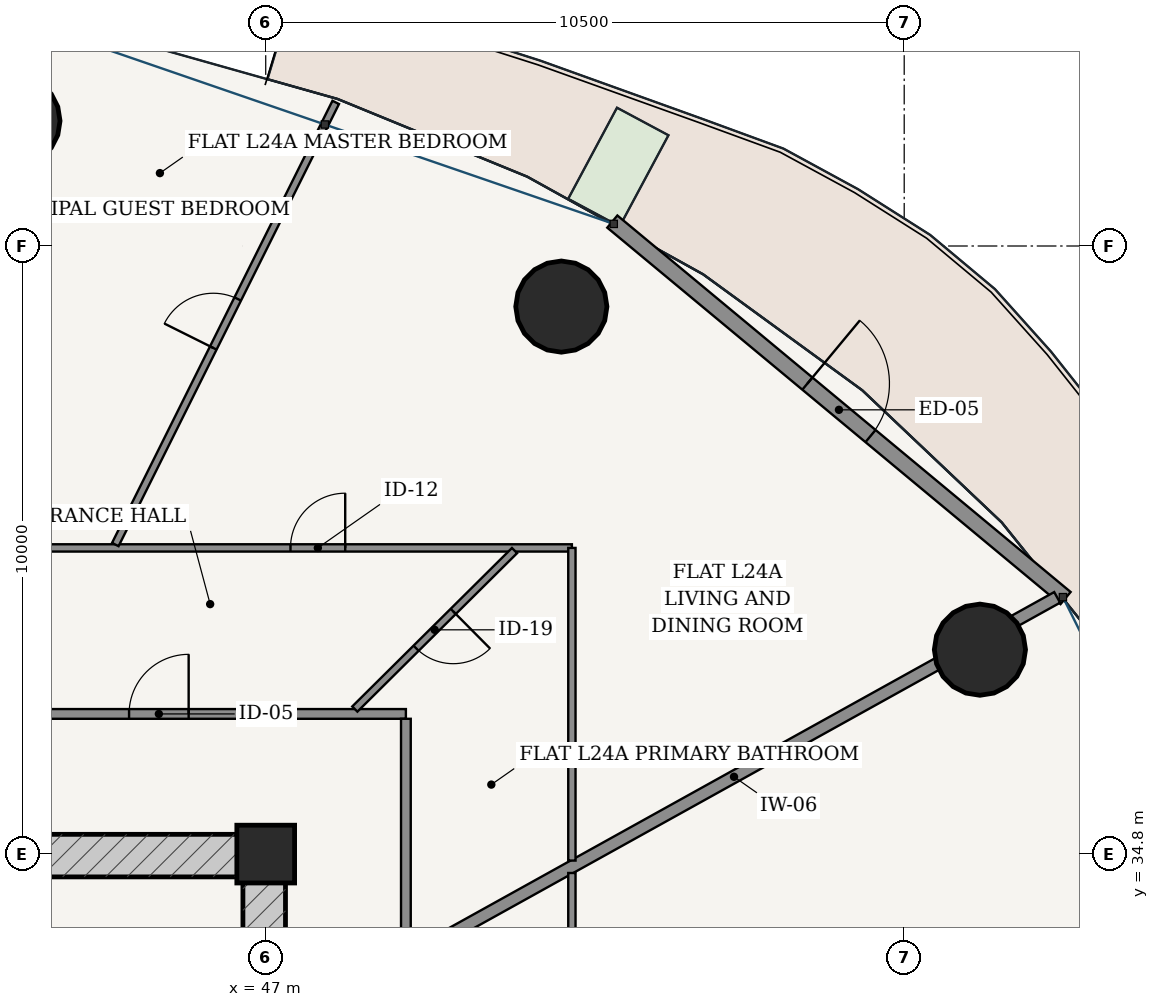
"""IFC4 building model, lengths in metres.
Left out: names, types, materials, properties, quantities, classifications, styles, units other than length and angle.
Written with IfcOpenShell. Run it as: python <this file> out.ifc"""

import sys

from ifc_helpers import new_model, si_unit, direction, frame, frame_2d, origin, origin_2d, place, context, subcontext, project, spatial, rectangle, hollow_circle, extrude, source, transform, mapped, element, fill, save


model = new_model("IFC4")
c1 = context("Model", 3, precision=1e-05, world=origin(), true_north=direction((-0.2419218956, 0.970295726276)))
c2 = subcontext(c1, "Body", "Model", "MODEL_VIEW")
j1 = project(units=[si_unit("LENGTHUNIT", "METRE"), si_unit("PLANEANGLEUNIT", "RADIAN")], contexts=[c1])
p1 = place(None, origin())
s1 = spatial("IfcSite", under=j1, at=p1, CompositionType="ELEMENT")
p2 = place(p1, origin())
s2 = spatial("IfcBuilding", under=s1, at=p2, CompositionType="ELEMENT")
p3 = place(p2, frame((0.0, 0.0, 94.2)))
s3 = spatial("IfcBuildingStorey", under=s2, at=p3, CompositionType="ELEMENT", Elevation=94.2)
p4 = place(p3, frame((47.0, 34.8, 0.0), z_axis=(0.0, 0.0, 1.0), x_axis=(1.0, 0.0, 0.0)))
e1 = element("IfcColumn", 1, at=p4, inside=s3, PredefinedType="COLUMN", context=c2, shape_type="SweptSolid", body=[
    extrude(rectangle(XDim=0.95, YDim=0.95, at=origin_2d()), origin(), (0.0, 0.0, 1.0), 3.6),
])
p5 = place(p3, frame((28.675, 34.775, 0.0), z_axis=(0.0, 0.0, 1.0), x_axis=(1.0, 0.0, 0.0)))
e2 = element("IfcWall", 2, at=p5, inside=s3, PredefinedType="SHEAR", context=c2, shape_type="SweptSolid", body=[
    extrude(rectangle(XDim=18.65, YDim=0.7, at=frame_2d((9.325, 0.0))), origin(), (0.0, 0.0, 1.0), 3.325),
])
p6 = place(p5, frame((8.9, 0.0, 0.0)))
e3 = element("IfcOpeningElement", 3, at=p6, cuts=e2, PredefinedType="OPENING", context=c2, shape_type="SweptSolid", body=[
    extrude(rectangle(XDim=0.85, YDim=2.1, at=frame_2d((0.425, 1.05))), frame((0.0, 0.36, 0.0), z_axis=(0.0, -1.0, 0.0), x_axis=(1.0, 0.0, 0.0)), (0.0, 0.0, 1.0), 0.72),
])
p7 = place(p3, frame((46.975, 19.175, 0.0), z_axis=(0.0, 0.0, 1.0), x_axis=(0.0, 1.0, 0.0)))
e4 = element("IfcWall", 4, at=p7, inside=s3, PredefinedType="SHEAR", context=c2, shape_type="SweptSolid", body=[
    extrude(rectangle(XDim=15.25, YDim=0.7, at=frame_2d((7.625, 0.0))), origin(), (0.0, 0.0, 1.0), 3.325),
])
p8 = place(p7, frame((9.875, 0.0, 0.0)))
e5 = element("IfcOpeningElement", 5, at=p8, cuts=e4, PredefinedType="OPENING", context=c2, shape_type="SweptSolid", body=[
    extrude(rectangle(XDim=1.5, YDim=2.2, at=frame_2d((0.75, 1.1))), frame((0.0, 0.36, 0.0), z_axis=(0.0, -1.0, 0.0), x_axis=(1.0, 0.0, 0.0)), (0.0, 0.0, 1.0), 0.72),
])
for number, where, z_axis, x_axis in (
    (6, (58.745, 38.161, 0.0), (0.0, 0.0, 1.0), (1.0, 0.0, 0.0)),
    (7, (51.862, 43.803, 0.0), (0.0, 0.0, 1.0), (1.0, 0.0, 0.0)),
    (8, (42.867, 46.857, 0.0), (0.0, 0.0, 1.0), (1.0, 0.0, 0.0)),
):
    element("IfcColumn", number, at=place(p3, frame(where, z_axis=z_axis, x_axis=x_axis)), inside=s3, PredefinedType="COLUMN", context=c2, shape_type="SweptSolid", body=[
        extrude(hollow_circle(Radius=0.75, WallThickness=0.045, at=origin_2d()), origin(), (0.0, 0.0, 1.0), 3.6),
    ])
p9 = place(p3, frame((60.154, 39.01, 0.0), z_axis=(0.0, 0.0, 1.0), x_axis=(-0.769242574941, 0.638956853706, 0.0)))
e9 = element("IfcWall", 9, at=p9, inside=s3, PredefinedType="SOLIDWALL", context=c2, shape_type="SweptSolid", body=[
    extrude(rectangle(XDim=9.69, YDim=0.26, at=frame_2d((4.845, 0.0))), origin(), (0.0, 0.0, 1.0), 3.325),
])
p10 = place(p9, frame((4.17, 0.0, 0.0)))
e10 = element("IfcOpeningElement", 10, at=p10, cuts=e9, PredefinedType="OPENING", context=c2, shape_type="SweptSolid", body=[
    extrude(rectangle(XDim=1.35, YDim=2.2, at=frame_2d((0.675, 1.1))), frame((0.0, 0.14, 0.0), z_axis=(0.0, -1.0, 0.0), x_axis=(1.0, 0.0, 0.0)), (0.0, 0.0, 1.0), 0.28),
])
p11 = place(p3, frame((26.695, 37.105, 0.0), z_axis=(0.0, 0.0, 1.0), x_axis=(1.0, 0.0, 0.0)))
e11 = element("IfcWall", 11, at=p11, inside=s3, PredefinedType="PARTITIONING", context=c2, shape_type="SweptSolid", body=[
    extrude(rectangle(XDim=22.61, YDim=0.16, at=frame_2d((11.305, 0.0))), origin(), (0.0, 0.0, 1.0), 2.767),
])
p12 = place(p11, frame((18.058, 0.0, 0.0)))
e12 = element("IfcOpeningElement", 12, at=p12, cuts=e11, PredefinedType="OPENING", context=c2, shape_type="SweptSolid", body=[
    extrude(rectangle(XDim=0.98, YDim=2.2, at=frame_2d((0.49, 1.1))), frame((0.0, 0.09, 0.0), z_axis=(0.0, -1.0, 0.0), x_axis=(1.0, 0.0, 0.0)), (0.0, 0.0, 1.0), 0.18),
])
p13 = place(p3, frame((49.305, 16.575, 0.0), z_axis=(0.0, 0.0, 1.0), x_axis=(0.0, 1.0, 0.0)))
e13 = element("IfcWall", 13, at=p13, inside=s3, PredefinedType="PARTITIONING", context=c2, shape_type="SweptSolid", body=[
    extrude(rectangle(XDim=20.45, YDim=0.16, at=frame_2d((10.225, 0.0))), origin(), (0.0, 0.0, 1.0), 2.767),
])
p14 = place(p3, frame((49.387, 33.121, 0.0), z_axis=(0.0, 0.0, 1.0), x_axis=(0.874320165728, 0.485349613992, 0.0)))
e14 = element("IfcWall", 14, at=p14, inside=s3, PredefinedType="PARTITIONING", context=c2, shape_type="SweptSolid", body=[
    extrude(rectangle(XDim=12.156, YDim=0.2, at=frame_2d((6.078, 0.0))), origin(), (0.0, 0.0, 1.0), 2.767),
])
p15 = place(p3, frame((23.965, 39.835, 0.0), z_axis=(0.0, 0.0, 1.0), x_axis=(1.0, 0.0, 0.0)))
e15 = element("IfcWall", 15, at=p15, inside=s3, PredefinedType="PARTITIONING", context=c2, shape_type="SweptSolid", body=[
    extrude(rectangle(XDim=28.07, YDim=0.12, at=frame_2d((14.035, 0.0))), origin(), (0.0, 0.0, 1.0), 2.767),
])
p16 = place(p15, frame((23.442, 0.0, 0.0)))
e16 = element("IfcOpeningElement", 16, at=p16, cuts=e15, PredefinedType="OPENING", context=c2, shape_type="SweptSolid", body=[
    extrude(rectangle(XDim=0.9, YDim=2.15, at=frame_2d((0.45, 1.075))), frame((0.0, 0.07, 0.0), z_axis=(0.0, -1.0, 0.0), x_axis=(1.0, 0.0, 0.0)), (0.0, 0.0, 1.0), 0.14),
])
p17 = place(p3, frame((52.035, 39.835, 0.0), z_axis=(0.0, 0.0, 1.0), x_axis=(0.0, -1.0, 0.0)))
e17 = element("IfcWall", 17, at=p17, inside=s3, PredefinedType="PARTITIONING", context=c2, shape_type="SweptSolid", body=[
    extrude(rectangle(XDim=5.142, YDim=0.12, at=frame_2d((2.571, 0.0))), origin(), (0.0, 0.0, 1.0), 3.004),
])
p18 = place(p3, frame((44.526, 39.89, 0.0), z_axis=(0.0, 0.0, 1.0), x_axis=(0.446167584581, 0.894949432353, 0.0)))
e18 = element("IfcWall", 18, at=p18, inside=s3, PredefinedType="PARTITIONING", context=c2, shape_type="SweptSolid", body=[
    extrude(rectangle(XDim=8.125, YDim=0.12, at=frame_2d((4.062, 0.0))), origin(), (0.0, 0.0, 1.0), 2.767),
])
p19 = place(p18, frame((3.612, 0.0, 0.0)))
e19 = element("IfcOpeningElement", 19, at=p19, cuts=e18, PredefinedType="OPENING", context=c2, shape_type="SweptSolid", body=[
    extrude(rectangle(XDim=0.9, YDim=2.15, at=frame_2d((0.45, 1.075))), frame((0.0, 0.07, 0.0), z_axis=(0.0, -1.0, 0.0), x_axis=(1.0, 0.0, 0.0)), (0.0, 0.0, 1.0), 0.14),
])
p20 = place(p3, frame((48.465, 37.185, 0.0), z_axis=(0.0, 0.0, 1.0), x_axis=(0.709839752998, 0.704363205359, 0.0)))
e20 = element("IfcWall", 20, at=p20, inside=s3, PredefinedType="PARTITIONING", context=c2, shape_type="SweptSolid", body=[
    extrude(rectangle(XDim=3.7, YDim=0.12, at=frame_2d((1.85, 0.0))), origin(), (0.0, 0.0, 1.0), 2.767),
])
p21 = place(p20, frame((1.42, 0.0, 0.0)))
e21 = element("IfcOpeningElement", 21, at=p21, cuts=e20, PredefinedType="OPENING", context=c2, shape_type="SweptSolid", body=[
    extrude(rectangle(XDim=0.86, YDim=2.15, at=frame_2d((0.43, 1.075))), frame((0.0, 0.07, 0.0), z_axis=(0.0, -1.0, 0.0), x_axis=(1.0, 0.0, 0.0)), (0.0, 0.0, 1.0), 0.14),
])
p22 = place(p3, frame((52.035, 34.49, 0.0), z_axis=(0.0, 0.0, 1.0), x_axis=(0.0, -1.0, 0.0)))
e22 = element("IfcWall", 22, at=p22, inside=s3, PredefinedType="PARTITIONING", context=c2, shape_type="SweptSolid", body=[
    extrude(rectangle(XDim=20.725, YDim=0.12, at=frame_2d((10.362, 0.0))), origin(), (0.0, 0.0, 1.0), 2.767),
])
p23 = place(p22, frame((17.493, 0.0, 0.0)))
e23 = element("IfcOpeningElement", 23, at=p23, cuts=e22, PredefinedType="OPENING", context=c2, shape_type="SweptSolid", body=[
    extrude(rectangle(XDim=0.9, YDim=2.15, at=frame_2d((0.45, 1.075))), frame((0.0, 0.07, 0.0), z_axis=(0.0, -1.0, 0.0), x_axis=(1.0, 0.0, 0.0)), (0.0, 0.0, 1.0), 0.14),
])
p24 = place(p22, frame((14.064, 0.0, 0.0)))
e24 = element("IfcOpeningElement", 24, at=p24, cuts=e22, PredefinedType="OPENING", context=c2, shape_type="SweptSolid", body=[
    extrude(rectangle(XDim=0.9, YDim=2.15, at=frame_2d((0.45, 1.075))), frame((0.0, 0.07, 0.0), z_axis=(0.0, -1.0, 0.0), x_axis=(1.0, 0.0, 0.0)), (0.0, 0.0, 1.0), 0.14),
])
m1 = source(origin(), c2, "Body", "SweptSolid", [
    extrude(rectangle(XDim=1.35, YDim=2.2, at=frame_2d((0.675, 1.1))), frame((0.0, 0.025, 0.0), z_axis=(0.0, -1.0, 0.0), x_axis=(1.0, 0.0, 0.0)), (0.0, 0.0, 1.0), 0.05),
])
p25 = place(p10, frame((1.35, 0.0, 0.0), z_axis=(0.0, 0.0, 1.0), x_axis=(-1.0, 0.0, 0.0)))
e25 = element("IfcDoor", 25, at=p25, inside=s3, OperationType="SINGLE_SWING_LEFT", PredefinedType="DOOR", context=c2, shape_type="MappedRepresentation", body=[
    mapped(m1, transform((0.0, 0.0, 0.0), scale=1.0)),
])
fill(e10, e25)
m2 = source(origin(), c2, "Body", "SweptSolid", [
    extrude(rectangle(XDim=0.98, YDim=2.2, at=frame_2d((0.49, 1.1))), frame((0.0, 0.025, 0.0), z_axis=(0.0, -1.0, 0.0), x_axis=(1.0, 0.0, 0.0)), (0.0, 0.0, 1.0), 0.05),
])
p26 = place(p12, origin())
e26 = element("IfcDoor", 26, at=p26, inside=s3, OperationType="SINGLE_SWING_RIGHT", PredefinedType="DOOR", context=c2, shape_type="MappedRepresentation", body=[
    mapped(m2, transform((0.0, 0.0, 0.0), scale=1.0)),
])
fill(e12, e26)
m3 = source(origin(), c2, "Body", "SweptSolid", [
    extrude(rectangle(XDim=0.86, YDim=2.15, at=frame_2d((0.43, 1.075))), frame((0.0, 0.025, 0.0), z_axis=(0.0, -1.0, 0.0), x_axis=(1.0, 0.0, 0.0)), (0.0, 0.0, 1.0), 0.05),
])
p27 = place(p21, frame((0.86, 0.0, 0.0), z_axis=(0.0, 0.0, 1.0), x_axis=(-1.0, 0.0, 0.0)))
e27 = element("IfcDoor", 27, at=p27, inside=s3, OperationType="SINGLE_SWING_LEFT", PredefinedType="DOOR", context=c2, shape_type="MappedRepresentation", body=[
    mapped(m3, transform((0.0, 0.0, 0.0), scale=1.0)),
])
fill(e21, e27)
m4 = source(origin(), c2, "Body", "SweptSolid", [
    extrude(rectangle(XDim=0.9, YDim=2.15, at=frame_2d((0.45, 1.075))), frame((0.0, 0.025, 0.0), z_axis=(0.0, -1.0, 0.0), x_axis=(1.0, 0.0, 0.0)), (0.0, 0.0, 1.0), 0.05),
])
p28 = place(p16, origin())
e28 = element("IfcDoor", 28, at=p28, inside=s3, OperationType="SINGLE_SWING_RIGHT", PredefinedType="DOOR", context=c2, shape_type="MappedRepresentation", body=[
    mapped(m4, transform((0.0, 0.0, 0.0), scale=1.0)),
])
fill(e16, e28)
p29 = place(p19, origin())
e29 = element("IfcDoor", 29, at=p29, inside=s3, OperationType="SINGLE_SWING_LEFT", PredefinedType="DOOR", context=c2, shape_type="MappedRepresentation", body=[
    mapped(m4, transform((0.0, 0.0, 0.0), scale=1.0)),
])
fill(e19, e29)
save(model, sys.argv[1])
